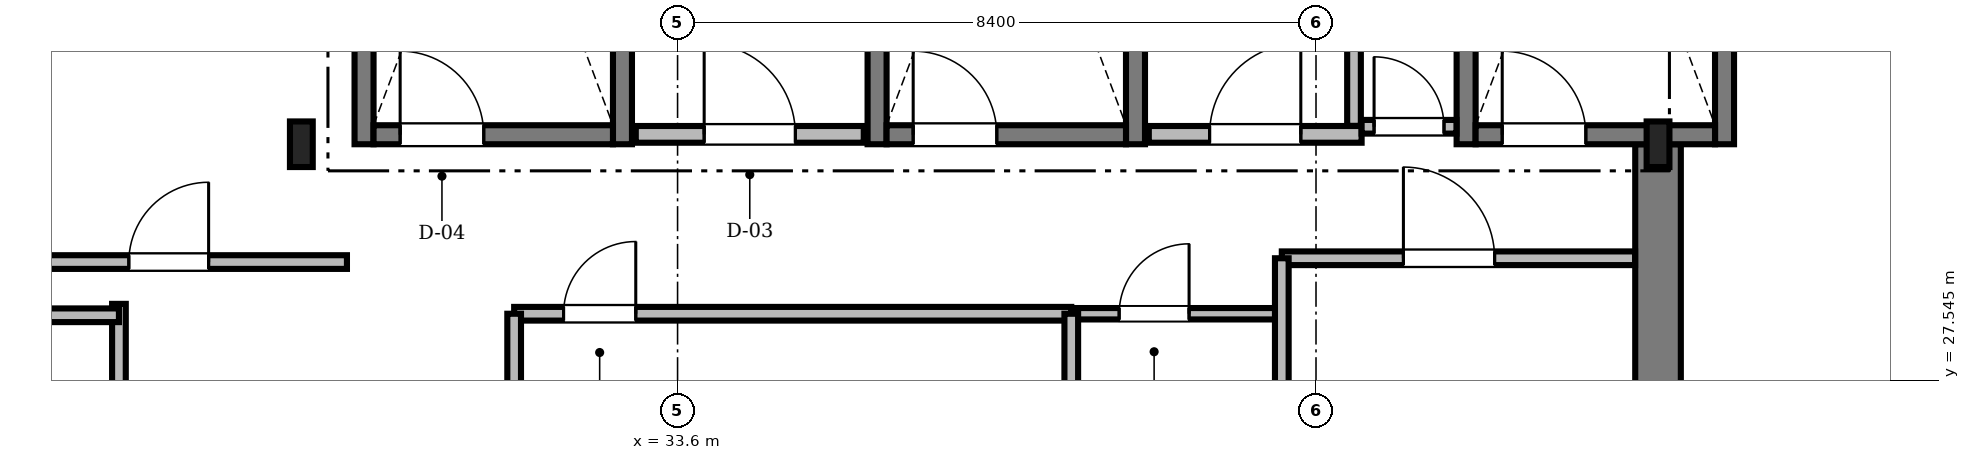
"""IFC4 building model, lengths in metres.
Left out: names, types, materials, properties, quantities, classifications, styles, units other than length and angle.
Written with IfcOpenShell. Run it as: python <this file> out.ifc"""

import sys

from ifc_helpers import new_model, si_unit, direction, frame, frame_2d, origin, origin_2d, place, context, subcontext, project, spatial, rectangle, i_section, extrude, source, transform, mapped, element, fill, save


model = new_model("IFC4")
c1 = context("Model", 3, precision=1e-05, world=origin(), true_north=direction((0.0, 1.0)))
c2 = subcontext(c1, "Body", "Model", "MODEL_VIEW")
j1 = project(units=[si_unit("LENGTHUNIT", "METRE"), si_unit("PLANEANGLEUNIT", "RADIAN")], contexts=[c1])
p1 = place(None, origin())
s1 = spatial("IfcSite", under=j1, at=p1, CompositionType="ELEMENT")
p2 = place(p1, origin())
s2 = spatial("IfcBuilding", under=s1, at=p2, CompositionType="ELEMENT")
p3 = place(p2, frame((0.0, 0.0, 282.2)))
s3 = spatial("IfcBuildingStorey", under=s2, at=p3, CompositionType="ELEMENT", Elevation=282.2)
m1 = source(origin(), c2, "Body", "SweptSolid", [
    extrude(rectangle(XDim=13.15, YDim=0.6, at=frame_2d((6.575, 0.0))), origin(), (0.0, 0.0, 1.0), 3.3),
])
p4 = place(p3, frame((46.5, 17.5, 0.0), z_axis=(0.0, 0.0, 1.0), x_axis=(0.0, 1.0, 0.0)))
e1 = element("IfcWall", 1, at=p4, inside=s3, PredefinedType="SHEAR", context=c2, shape_type="MappedRepresentation", body=[
    mapped(m1, transform((0.0, 0.0, 0.0), scale=1.0)),
])
m2 = source(origin(), c2, "Body", "SweptSolid", [
    extrude(i_section(OverallWidth=0.3, OverallDepth=0.6, WebThickness=0.015, FlangeThickness=0.03, FilletRadius=0.027, at=origin_2d()), origin(), (0.0, 0.0, 1.0), 3.3),
])
for number, where, z_axis, x_axis in (
    (2, (28.65, 30.65, 0.0), (0.0, 0.0, 1.0), (1.0, 0.0, 0.0)),
    (3, (46.5, 30.65, 0.0), (0.0, 0.0, 1.0), (1.0, 0.0, 0.0)),
):
    element("IfcColumn", number, at=place(p3, frame(where, z_axis=z_axis, x_axis=x_axis)), inside=s3, PredefinedType="COLUMN", context=c2, shape_type="MappedRepresentation", body=[
        mapped(m2, transform((0.0, 0.0, 0.0), scale=1.0)),
    ])
m3 = source(origin(), c2, "Body", "SweptSolid", [
    extrude(i_section(OverallWidth=0.405, OverallDepth=0.403, WebThickness=0.018, FlangeThickness=0.028, FilletRadius=0.015, at=origin_2d()), origin(), (0.0, 0.0, 1.0), 6.024),
])
p5 = place(p3, frame((20.53, 28.9, 0.0), z_axis=(0.836616759812, 0.0, 0.54778864282), x_axis=(0.0, 1.0, 0.0)))
e4 = element("IfcColumn", 4, at=p5, inside=s3, PredefinedType="COLUMN", context=c2, shape_type="MappedRepresentation", body=[
    mapped(m3, transform((0.0, 0.0, 0.0), scale=1.0)),
])
m4 = source(origin(), c2, "Body", "SweptSolid", [
    extrude(rectangle(XDim=9.35, YDim=0.25, at=frame_2d((4.675, 0.0))), origin(), (0.0, 0.0, 1.0), 3.75),
])
for number, where, z_axis, x_axis in (
    (5, (29.475, 30.65, 0.0), (0.0, 0.0, 1.0), (0.0, 1.0, 0.0)),
    (6, (32.875, 30.65, 0.0), (0.0, 0.0, 1.0), (0.0, 1.0, 0.0)),
):
    element("IfcWall", number, at=place(p3, frame(where, z_axis=z_axis, x_axis=x_axis)), inside=s3, PredefinedType="SOLIDWALL", context=c2, shape_type="MappedRepresentation", body=[
        mapped(m4, transform((0.0, 0.0, 0.0), scale=1.0)),
    ])
m5 = source(origin(), c2, "Body", "SweptSolid", [
    extrude(rectangle(XDim=3.15, YDim=0.25, at=frame_2d((1.575, 0.0))), origin(), (0.0, 0.0, 1.0), 3.75),
])
p6 = place(p3, frame((29.6, 30.775, 0.0), z_axis=(0.0, 0.0, 1.0), x_axis=(1.0, 0.0, 0.0)))
e7 = element("IfcWall", 7, at=p6, inside=s3, PredefinedType="SOLIDWALL", context=c2, shape_type="MappedRepresentation", body=[
    mapped(m5, transform((0.0, 0.0, 0.0), scale=1.0)),
])
m6 = source(origin(), c2, "Body", "SweptSolid", [
    extrude(rectangle(XDim=1.1, YDim=2.2, at=frame_2d((0.55, 1.1))), frame((0.0, 0.135, 0.0), z_axis=(0.0, -1.0, 0.0), x_axis=(1.0, 0.0, 0.0)), (0.0, 0.0, 1.0), 0.27),
])
p7 = place(p6, frame((0.35, 0.0, 0.0)))
e8 = element("IfcOpeningElement", 8, at=p7, cuts=e7, PredefinedType="OPENING", context=c2, shape_type="MappedRepresentation", body=[
    mapped(m6, transform((0.0, 0.0, 0.0), scale=1.0)),
])
for number, where, z_axis, x_axis in (
    (9, (36.225, 30.65, 0.0), (0.0, 0.0, 1.0), (0.0, 1.0, 0.0)),
    (10, (39.625, 30.65, 0.0), (0.0, 0.0, 1.0), (0.0, 1.0, 0.0)),
):
    element("IfcWall", number, at=place(p3, frame(where, z_axis=z_axis, x_axis=x_axis)), inside=s3, PredefinedType="SOLIDWALL", context=c2, shape_type="MappedRepresentation", body=[
        mapped(m4, transform((0.0, 0.0, 0.0), scale=1.0)),
    ])
p8 = place(p3, frame((36.35, 30.775, 0.0), z_axis=(0.0, 0.0, 1.0), x_axis=(1.0, 0.0, 0.0)))
e11 = element("IfcWall", 11, at=p8, inside=s3, PredefinedType="SOLIDWALL", context=c2, shape_type="MappedRepresentation", body=[
    mapped(m5, transform((0.0, 0.0, 0.0), scale=1.0)),
])
p9 = place(p8, frame((0.35, 0.0, 0.0)))
e12 = element("IfcOpeningElement", 12, at=p9, cuts=e11, PredefinedType="OPENING", context=c2, shape_type="MappedRepresentation", body=[
    mapped(m6, transform((0.0, 0.0, 0.0), scale=1.0)),
])
for number, where, z_axis, x_axis in (
    (13, (43.975, 30.65, 0.0), (0.0, 0.0, 1.0), (0.0, 1.0, 0.0)),
    (14, (47.375, 30.65, 0.0), (0.0, 0.0, 1.0), (0.0, 1.0, 0.0)),
):
    element("IfcWall", number, at=place(p3, frame(where, z_axis=z_axis, x_axis=x_axis)), inside=s3, PredefinedType="SOLIDWALL", context=c2, shape_type="MappedRepresentation", body=[
        mapped(m4, transform((0.0, 0.0, 0.0), scale=1.0)),
    ])
p10 = place(p3, frame((44.1, 30.775, 0.0), z_axis=(0.0, 0.0, 1.0), x_axis=(1.0, 0.0, 0.0)))
e15 = element("IfcWall", 15, at=p10, inside=s3, PredefinedType="SOLIDWALL", context=c2, shape_type="MappedRepresentation", body=[
    mapped(m5, transform((0.0, 0.0, 0.0), scale=1.0)),
])
p11 = place(p10, frame((0.35, 0.0, 0.0)))
e16 = element("IfcOpeningElement", 16, at=p11, cuts=e15, PredefinedType="OPENING", context=c2, shape_type="MappedRepresentation", body=[
    mapped(m6, transform((0.0, 0.0, 0.0), scale=1.0)),
])
m7 = source(origin(), c2, "Body", "SweptSolid", [
    extrude(rectangle(XDim=3.0, YDim=0.22, at=frame_2d((1.5, 0.0))), origin(), (0.0, 0.0, 1.0), 3.3),
])
p12 = place(p3, frame((33.05, 30.78, 0.0), z_axis=(0.0, 0.0, 1.0), x_axis=(1.0, 0.0, 0.0)))
e17 = element("IfcWall", 17, at=p12, inside=s3, PredefinedType="SOLIDWALL", context=c2, shape_type="MappedRepresentation", body=[
    mapped(m7, transform((0.0, 0.0, 0.0), scale=1.0)),
])
m8 = source(origin(), c2, "Body", "SweptSolid", [
    extrude(rectangle(XDim=1.2, YDim=2.2, at=frame_2d((0.6, 1.1))), frame((0.0, 0.12, 0.0), z_axis=(0.0, -1.0, 0.0), x_axis=(1.0, 0.0, 0.0)), (0.0, 0.0, 1.0), 0.24),
])
p13 = place(p12, frame((0.9, 0.0, 0.0)))
e18 = element("IfcOpeningElement", 18, at=p13, cuts=e17, PredefinedType="OPENING", context=c2, shape_type="MappedRepresentation", body=[
    mapped(m8, transform((0.0, 0.0, 0.0), scale=1.0)),
])
m9 = source(origin(), c2, "Body", "SweptSolid", [
    extrude(rectangle(XDim=2.8, YDim=0.22, at=frame_2d((1.4, 0.0))), origin(), (0.0, 0.0, 1.0), 3.3),
])
p14 = place(p3, frame((39.8, 30.78, 0.0), z_axis=(0.0, 0.0, 1.0), x_axis=(1.0, 0.0, 0.0)))
e19 = element("IfcWall", 19, at=p14, inside=s3, PredefinedType="SOLIDWALL", context=c2, shape_type="MappedRepresentation", body=[
    mapped(m9, transform((0.0, 0.0, 0.0), scale=1.0)),
])
p15 = place(p14, frame((0.8, 0.0, 0.0)))
e20 = element("IfcOpeningElement", 20, at=p15, cuts=e19, PredefinedType="OPENING", context=c2, shape_type="MappedRepresentation", body=[
    mapped(m8, transform((0.0, 0.0, 0.0), scale=1.0)),
])
m10 = source(origin(), c2, "Body", "SweptSolid", [
    extrude(rectangle(XDim=14.54, YDim=0.18, at=frame_2d((7.27, 0.0))), origin(), (0.0, 0.0, 1.0), 2.478),
])
p16 = place(p3, frame((26.25, 14.01, 0.0), z_axis=(0.0, 0.0, 1.0), x_axis=(0.0, 1.0, 0.0)))
e21 = element("IfcWall", 21, at=p16, inside=s3, PredefinedType="PARTITIONING", context=c2, shape_type="MappedRepresentation", body=[
    mapped(m10, transform((0.0, 0.0, 0.0), scale=1.0)),
])
m11 = source(origin(), c2, "Body", "SweptSolid", [
    extrude(rectangle(XDim=1.05, YDim=2.2, at=frame_2d((0.525, 1.1))), frame((0.0, 0.1, 0.0), z_axis=(0.0, -1.0, 0.0), x_axis=(1.0, 0.0, 0.0)), (0.0, 0.0, 1.0), 0.2),
])
p17 = place(p16, frame((3.077, 0.0, 0.0)))
e22 = element("IfcOpeningElement", 22, at=p17, cuts=e21, PredefinedType="OPENING", context=c2, shape_type="MappedRepresentation", body=[
    mapped(m11, transform((0.0, 0.0, 0.0), scale=1.0)),
])
m12 = source(origin(), c2, "Body", "SweptSolid", [
    extrude(rectangle(XDim=0.95, YDim=2.15, at=frame_2d((0.475, 1.075))), frame((0.0, 0.1, 0.0), z_axis=(0.0, -1.0, 0.0), x_axis=(1.0, 0.0, 0.0)), (0.0, 0.0, 1.0), 0.2),
])
p18 = place(p16, frame((11.498, 0.0, 0.0)))
e23 = element("IfcOpeningElement", 23, at=p18, cuts=e21, PredefinedType="OPENING", context=c2, shape_type="MappedRepresentation", body=[
    mapped(m12, transform((0.0, 0.0, 0.0), scale=1.0)),
])
m13 = source(origin(), c2, "Body", "SweptSolid", [
    extrude(rectangle(XDim=9.548, YDim=0.18, at=frame_2d((4.774, 0.0))), origin(), (0.0, 0.0, 1.0), 2.08),
])
p19 = place(p3, frame((19.702, 29.1, 0.0), z_axis=(0.0, 0.0, 1.0), x_axis=(1.0, 0.0, 0.0)))
e24 = element("IfcWall", 24, at=p19, inside=s3, PredefinedType="PARTITIONING", context=c2, shape_type="MappedRepresentation", body=[
    mapped(m13, transform((0.0, 0.0, 0.0), scale=1.0)),
])
p20 = place(p19, frame((6.678, 0.0, 0.0)))
e25 = element("IfcOpeningElement", 25, at=p20, cuts=e24, PredefinedType="OPENING", context=c2, shape_type="MappedRepresentation", body=[
    mapped(m11, transform((0.0, 0.0, 0.0), scale=1.0)),
])
m14 = source(origin(), c2, "Body", "SweptSolid", [
    extrude(rectangle(XDim=7.33, YDim=0.18, at=frame_2d((3.665, 0.0))), origin(), (0.0, 0.0, 1.0), 2.932),
])
p21 = place(p3, frame((31.45, 28.42, 0.0), z_axis=(0.0, 0.0, 1.0), x_axis=(1.0, 0.0, 0.0)))
e26 = element("IfcWall", 26, at=p21, inside=s3, PredefinedType="PARTITIONING", context=c2, shape_type="MappedRepresentation", body=[
    mapped(m14, transform((0.0, 0.0, 0.0), scale=1.0)),
])
p22 = place(p21, frame((0.65, 0.0, 0.0)))
e27 = element("IfcOpeningElement", 27, at=p22, cuts=e26, PredefinedType="OPENING", context=c2, shape_type="MappedRepresentation", body=[
    mapped(m12, transform((0.0, 0.0, 0.0), scale=1.0)),
])
m15 = source(origin(), c2, "Body", "SweptSolid", [
    extrude(rectangle(XDim=4.648, YDim=0.18, at=frame_2d((2.324, 0.0))), origin(), (0.0, 0.0, 1.0), 2.932),
])
p23 = place(p3, frame((41.55, 29.15, 0.0), z_axis=(0.0, 0.0, 1.0), x_axis=(1.0, 0.0, 0.0)))
e28 = element("IfcWall", 28, at=p23, inside=s3, PredefinedType="PARTITIONING", context=c2, shape_type="MappedRepresentation", body=[
    mapped(m15, transform((0.0, 0.0, 0.0), scale=1.0)),
])
m16 = source(origin(), c2, "Body", "SweptSolid", [
    extrude(rectangle(XDim=1.2, YDim=2.2, at=frame_2d((0.6, 1.1))), frame((0.0, 0.1, 0.0), z_axis=(0.0, -1.0, 0.0), x_axis=(1.0, 0.0, 0.0)), (0.0, 0.0, 1.0), 0.2),
])
p24 = place(p23, frame((1.6, 0.0, 0.0)))
e29 = element("IfcOpeningElement", 29, at=p24, cuts=e28, PredefinedType="OPENING", context=c2, shape_type="MappedRepresentation", body=[
    mapped(m16, transform((0.0, 0.0, 0.0), scale=1.0)),
])
m17 = source(origin(), c2, "Body", "SweptSolid", [
    extrude(rectangle(XDim=2.74, YDim=0.15, at=frame_2d((1.37, 0.0))), origin(), (0.0, 0.0, 1.0), 3.3),
])
p25 = place(p3, frame((38.78, 28.42, 0.0), z_axis=(0.0, 0.0, 1.0), x_axis=(1.0, 0.0, 0.0)))
e30 = element("IfcWall", 30, at=p25, inside=s3, PredefinedType="PARTITIONING", context=c2, shape_type="MappedRepresentation", body=[
    mapped(m17, transform((0.0, 0.0, 0.0), scale=1.0)),
])
m18 = source(origin(), c2, "Body", "SweptSolid", [
    extrude(rectangle(XDim=0.92, YDim=2.1, at=frame_2d((0.46, 1.05))), frame((0.0, 0.085, 0.0), z_axis=(0.0, -1.0, 0.0), x_axis=(1.0, 0.0, 0.0)), (0.0, 0.0, 1.0), 0.17),
])
p26 = place(p25, frame((0.63, 0.0, 0.0)))
e31 = element("IfcOpeningElement", 31, at=p26, cuts=e30, PredefinedType="OPENING", context=c2, shape_type="MappedRepresentation", body=[
    mapped(m18, transform((0.0, 0.0, 0.0), scale=1.0)),
])
m19 = source(origin(), c2, "Body", "SweptSolid", [
    extrude(rectangle(XDim=1.248, YDim=0.18, at=frame_2d((0.624, 0.0))), origin(), (0.0, 0.0, 1.0), 3.3),
])
p27 = place(p3, frame((42.6, 30.88, 0.0), z_axis=(0.0, 0.0, 1.0), x_axis=(1.0, 0.0, 0.0)))
e32 = element("IfcWall", 32, at=p27, inside=s3, PredefinedType="PARTITIONING", context=c2, shape_type="MappedRepresentation", body=[
    mapped(m19, transform((0.0, 0.0, 0.0), scale=1.0)),
])
m20 = source(origin(), c2, "Body", "SweptSolid", [
    extrude(rectangle(XDim=0.92, YDim=2.1, at=frame_2d((0.46, 1.05))), frame((0.0, 0.1, 0.0), z_axis=(0.0, -1.0, 0.0), x_axis=(1.0, 0.0, 0.0)), (0.0, 0.0, 1.0), 0.2),
])
p28 = place(p27, frame((0.164, 0.0, 0.0)))
e33 = element("IfcOpeningElement", 33, at=p28, cuts=e32, PredefinedType="OPENING", context=c2, shape_type="MappedRepresentation", body=[
    mapped(m20, transform((0.0, 0.0, 0.0), scale=1.0)),
])
m21 = source(origin(), c2, "Body", "SweptSolid", [
    extrude(rectangle(XDim=6.74, YDim=0.18, at=frame_2d((3.37, 0.0))), origin(), (0.0, 0.0, 1.0), 2.08),
])
p29 = place(p3, frame((19.51, 28.4, 0.0), z_axis=(0.0, 0.0, 1.0), x_axis=(1.0, 0.0, 0.0)))
e34 = element("IfcWall", 34, at=p29, inside=s3, PredefinedType="PARTITIONING", context=c2, shape_type="MappedRepresentation", body=[
    mapped(m21, transform((0.0, 0.0, 0.0), scale=1.0)),
])
m22 = source(origin(), c2, "Body", "SweptSolid", [
    extrude(rectangle(XDim=2.758, YDim=0.18, at=frame_2d((1.379, 0.0))), origin(), (0.0, 0.0, 1.0), 3.3),
])
p30 = place(p3, frame((42.5, 30.892, 0.0), z_axis=(0.0, 0.0, 1.0), x_axis=(0.0, 1.0, 0.0)))
e35 = element("IfcWall", 35, at=p30, inside=s3, PredefinedType="PARTITIONING", context=c2, shape_type="MappedRepresentation", body=[
    mapped(m22, transform((0.0, 0.0, 0.0), scale=1.0)),
])
m23 = source(origin(), c2, "Body", "SweptSolid", [
    extrude(rectangle(XDim=2.35, YDim=0.18, at=frame_2d((1.175, 0.0))), origin(), (0.0, 0.0, 1.0), 2.932),
])
p31 = place(p3, frame((41.55, 26.8, 0.0), z_axis=(0.0, 0.0, 1.0), x_axis=(0.0, 1.0, 0.0)))
e36 = element("IfcWall", 36, at=p31, inside=s3, PredefinedType="PARTITIONING", context=c2, shape_type="MappedRepresentation", body=[
    mapped(m23, transform((0.0, 0.0, 0.0), scale=1.0)),
])
m24 = source(origin(), c2, "Body", "SweptSolid", [
    extrude(rectangle(XDim=1.6, YDim=0.18, at=frame_2d((0.8, 0.0))), origin(), (0.0, 0.0, 1.0), 2.842),
])
for number, where, z_axis, x_axis in (
    (37, (31.45, 26.82, 0.0), (0.0, 0.0, 1.0), (0.0, 1.0, 0.0)),
    (38, (38.78, 26.82, 0.0), (0.0, 0.0, 1.0), (0.0, 1.0, 0.0)),
):
    element("IfcWall", number, at=place(p3, frame(where, z_axis=z_axis, x_axis=x_axis)), inside=s3, PredefinedType="PARTITIONING", context=c2, shape_type="MappedRepresentation", body=[
        mapped(m24, transform((0.0, 0.0, 0.0), scale=1.0)),
    ])
m25 = source(origin(), c2, "Body", "SweptSolid", [
    extrude(rectangle(XDim=1.1, YDim=2.2, at=frame_2d((0.55, 1.1))), frame((0.0, 0.025, 0.0), z_axis=(0.0, -1.0, 0.0), x_axis=(1.0, 0.0, 0.0)), (0.0, 0.0, 1.0), 0.05),
])
p32 = place(p7, origin())
e39 = element("IfcDoor", 39, at=p32, inside=s3, OperationType="SINGLE_SWING_LEFT", PredefinedType="DOOR", context=c2, shape_type="MappedRepresentation", body=[
    mapped(m25, transform((0.0, 0.0, 0.0), scale=1.0)),
])
fill(e8, e39)
p33 = place(p9, origin())
e40 = element("IfcDoor", 40, at=p33, inside=s3, OperationType="SINGLE_SWING_LEFT", PredefinedType="DOOR", context=c2, shape_type="MappedRepresentation", body=[
    mapped(m25, transform((0.0, 0.0, 0.0), scale=1.0)),
])
fill(e12, e40)
p34 = place(p11, origin())
e41 = element("IfcDoor", 41, at=p34, inside=s3, OperationType="SINGLE_SWING_LEFT", PredefinedType="DOOR", context=c2, shape_type="MappedRepresentation", body=[
    mapped(m25, transform((0.0, 0.0, 0.0), scale=1.0)),
])
fill(e16, e41)
m26 = source(origin(), c2, "Body", "SweptSolid", [
    extrude(rectangle(XDim=1.2, YDim=2.2, at=frame_2d((0.6, 1.1))), frame((0.0, 0.025, 0.0), z_axis=(0.0, -1.0, 0.0), x_axis=(1.0, 0.0, 0.0)), (0.0, 0.0, 1.0), 0.05),
])
p35 = place(p13, origin())
e42 = element("IfcDoor", 42, at=p35, inside=s3, OperationType="SINGLE_SWING_LEFT", PredefinedType="DOOR", context=c2, shape_type="MappedRepresentation", body=[
    mapped(m26, transform((0.0, 0.0, 0.0), scale=1.0)),
])
fill(e18, e42)
p36 = place(p15, origin())
e43 = element("IfcDoor", 43, at=p36, inside=s3, OperationType="SINGLE_SWING_RIGHT", PredefinedType="DOOR", context=c2, shape_type="MappedRepresentation", body=[
    mapped(m26, transform((0.0, 0.0, 0.0), scale=1.0)),
])
fill(e20, e43)
m27 = source(origin(), c2, "Body", "SweptSolid", [
    extrude(rectangle(XDim=1.05, YDim=2.2, at=frame_2d((0.525, 1.1))), frame((0.0, 0.025, 0.0), z_axis=(0.0, -1.0, 0.0), x_axis=(1.0, 0.0, 0.0)), (0.0, 0.0, 1.0), 0.05),
])
p37 = place(p20, origin())
e44 = element("IfcDoor", 44, at=p37, inside=s3, OperationType="SINGLE_SWING_RIGHT", PredefinedType="DOOR", context=c2, shape_type="MappedRepresentation", body=[
    mapped(m27, transform((0.0, 0.0, 0.0), scale=1.0)),
])
fill(e25, e44)
m28 = source(origin(), c2, "Body", "SweptSolid", [
    extrude(rectangle(XDim=0.95, YDim=2.15, at=frame_2d((0.475, 1.075))), frame((0.0, 0.025, 0.0), z_axis=(0.0, -1.0, 0.0), x_axis=(1.0, 0.0, 0.0)), (0.0, 0.0, 1.0), 0.05),
])
p38 = place(p22, origin())
e45 = element("IfcDoor", 45, at=p38, inside=s3, OperationType="SINGLE_SWING_RIGHT", PredefinedType="DOOR", context=c2, shape_type="MappedRepresentation", body=[
    mapped(m28, transform((0.0, 0.0, 0.0), scale=1.0)),
])
fill(e27, e45)
p39 = place(p24, origin())
e46 = element("IfcDoor", 46, at=p39, inside=s3, OperationType="SINGLE_SWING_LEFT", PredefinedType="DOOR", context=c2, shape_type="MappedRepresentation", body=[
    mapped(m26, transform((0.0, 0.0, 0.0), scale=1.0)),
])
fill(e29, e46)
m29 = source(origin(), c2, "Body", "SweptSolid", [
    extrude(rectangle(XDim=0.92, YDim=2.1, at=frame_2d((0.46, 1.05))), frame((0.0, 0.025, 0.0), z_axis=(0.0, -1.0, 0.0), x_axis=(1.0, 0.0, 0.0)), (0.0, 0.0, 1.0), 0.05),
])
p40 = place(p26, origin())
e47 = element("IfcDoor", 47, at=p40, inside=s3, OperationType="SINGLE_SWING_RIGHT", PredefinedType="DOOR", context=c2, shape_type="MappedRepresentation", body=[
    mapped(m29, transform((0.0, 0.0, 0.0), scale=1.0)),
])
fill(e31, e47)
p41 = place(p28, origin())
e48 = element("IfcDoor", 48, at=p41, inside=s3, OperationType="SINGLE_SWING_LEFT", PredefinedType="DOOR", context=c2, shape_type="MappedRepresentation", body=[
    mapped(m29, transform((0.0, 0.0, 0.0), scale=1.0)),
])
fill(e33, e48)
save(model, sys.argv[1])
